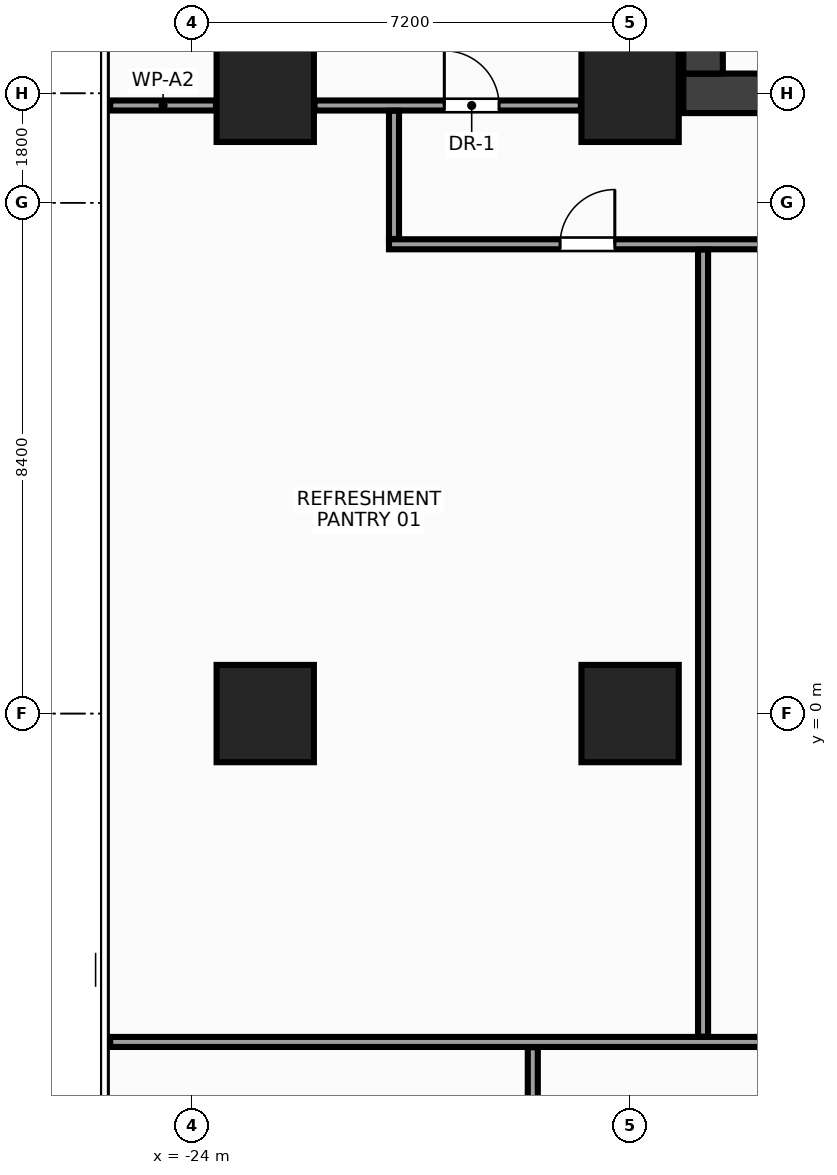
"""IFC4 building model, lengths in metres.
Left out: names, types, materials, properties, quantities, classifications, styles, units other than length and angle.
Written with IfcOpenShell. Run it as: python <this file> out.ifc"""

import sys

from ifc_helpers import new_model, si_unit, direction, frame, frame_2d, origin, origin_2d, place, context, subcontext, project, spatial, rectangle, extrude, source, transform, mapped, element, fill, save


model = new_model("IFC4")
c1 = context("Model", 3, precision=1e-05, world=origin(), true_north=direction((0.0, 1.0)))
c2 = subcontext(c1, "Body", "Model", "MODEL_VIEW")
j1 = project(units=[si_unit("LENGTHUNIT", "METRE"), si_unit("PLANEANGLEUNIT", "RADIAN")], contexts=[c1])
p1 = place(None, origin())
s1 = spatial("IfcSite", under=j1, at=p1, CompositionType="ELEMENT")
p2 = place(p1, origin())
s2 = spatial("IfcBuilding", under=s1, at=p2, CompositionType="ELEMENT")
p3 = place(p2, frame((0.0, 0.0, 106.4)))
s3 = spatial("IfcBuildingStorey", under=s2, at=p3, CompositionType="ELEMENT", Elevation=106.4)
m1 = source(origin(), c2, "Body", "SweptSolid", [
    extrude(rectangle(XDim=31.85, YDim=0.65, at=frame_2d((15.925, 0.0))), origin(), (0.0, 0.0, 1.0), 3.6),
])
p4 = place(p3, frame((-15.925, 10.2, 0.0), z_axis=(0.0, 0.0, 1.0), x_axis=(1.0, 0.0, 0.0)))
e1 = element("IfcWall", 1, at=p4, inside=s3, PredefinedType="SHEAR", context=c2, shape_type="MappedRepresentation", body=[
    mapped(m1, transform((0.0, 0.0, 0.0), x_axis=(1.0, 0.0, 0.0), y_axis=(0.0, 1.0, 0.0), z_axis=(0.0, 0.0, 1.0), scale=1.0)),
])
p5 = place(p4, frame((1.775, 0.0, 0.0)))
e2 = element("IfcOpeningElement", 2, at=p5, cuts=e1, PredefinedType="OPENING", context=c2, shape_type="SweptSolid", body=[
    extrude(rectangle(XDim=1.6, YDim=2.15, at=frame_2d((0.8, 1.075))), frame((0.0, 0.337, 0.0), z_axis=(0.0, -1.0, 0.0), x_axis=(1.0, 0.0, 0.0)), (0.0, 0.0, 1.0), 0.674),
])
p6 = place(p4, frame((28.475, 0.0, 0.0)))
e3 = element("IfcOpeningElement", 3, at=p6, cuts=e1, PredefinedType="OPENING", context=c2, shape_type="SweptSolid", body=[
    extrude(rectangle(XDim=1.6, YDim=2.15, at=frame_2d((0.8, 1.075))), frame((0.0, 0.337, 0.0), z_axis=(0.0, -1.0, 0.0), x_axis=(1.0, 0.0, 0.0)), (0.0, 0.0, 1.0), 0.674),
])
p7 = place(p4, frame((15.175, 0.0, 0.0)))
e4 = element("IfcOpeningElement", 4, at=p7, cuts=e1, PredefinedType="OPENING", context=c2, shape_type="SweptSolid", body=[
    extrude(rectangle(XDim=1.5, YDim=2.2, at=frame_2d((0.75, 1.1))), frame((0.0, 0.337, 0.0), z_axis=(0.0, -1.0, 0.0), x_axis=(1.0, 0.0, 0.0)), (0.0, 0.0, 1.0), 0.674),
])
m2 = source(origin(), c2, "Body", "SweptSolid", [
    extrude(rectangle(XDim=12.95, YDim=0.65, at=frame_2d((6.475, 0.0))), origin(), (0.0, 0.0, 1.0), 3.6),
])
p8 = place(p3, frame((-15.6, 10.525, 0.0), z_axis=(0.0, 0.0, 1.0), x_axis=(0.0, 1.0, 0.0)))
e5 = element("IfcWall", 5, at=p8, inside=s3, PredefinedType="SHEAR", context=c2, shape_type="MappedRepresentation", body=[
    mapped(m2, transform((0.0, 0.0, 0.0), x_axis=(1.0, 0.0, 0.0), y_axis=(0.0, 1.0, 0.0), z_axis=(0.0, 0.0, 1.0), scale=1.0)),
])
m3 = source(origin(), c2, "Body", "SweptSolid", [
    extrude(rectangle(XDim=1.6, YDim=1.6, at=origin_2d()), origin(), (0.0, 0.0, 1.0), 3.6),
])
for number, where, z_axis, x_axis in (
    (6, (-16.8, 0.0, 0.0), (0.0, 0.0, 1.0), (1.0, 0.0, 0.0)),
    (7, (-16.8, 10.2, 0.0), (0.0, 0.0, 1.0), (1.0, 0.0, 0.0)),
    (8, (-22.8, 0.0, 0.0), (0.0, 0.0, 1.0), (1.0, 0.0, 0.0)),
    (9, (-22.8, 10.2, 0.0), (0.0, 0.0, 1.0), (1.0, 0.0, 0.0)),
):
    element("IfcColumn", number, at=place(p3, frame(where, z_axis=z_axis, x_axis=x_axis)), inside=s3, PredefinedType="COLUMN", context=c2, shape_type="MappedRepresentation", body=[
        mapped(m3, transform((0.0, 0.0, 0.0), x_axis=(1.0, 0.0, 0.0), y_axis=(0.0, 1.0, 0.0), z_axis=(0.0, 0.0, 1.0), scale=1.0)),
    ])
m4 = source(origin(), c2, "Body", "SweptSolid", [
    extrude(rectangle(XDim=1.74, YDim=0.165, at=frame_2d((0.87, 0.0))), origin(), (0.0, 0.0, 1.0), 3.36),
])
p9 = place(p3, frame((-25.35, 10.0, 0.0), z_axis=(0.0, 0.0, 1.0), x_axis=(1.0, 0.0, 0.0)))
e10 = element("IfcWall", 10, at=p9, inside=s3, PredefinedType="PARTITIONING", context=c2, shape_type="MappedRepresentation", body=[
    mapped(m4, transform((0.0, 0.0, 0.0), x_axis=(1.0, 0.0, 0.0), y_axis=(0.0, 1.0, 0.0), z_axis=(0.0, 0.0, 1.0), scale=1.0)),
])
m5 = source(origin(), c2, "Body", "SweptSolid", [
    extrude(rectangle(XDim=4.38, YDim=0.165, at=frame_2d((2.19, 0.0))), origin(), (0.0, 0.0, 1.0), 2.745),
])
p10 = place(p3, frame((-21.99, 10.0, 0.0), z_axis=(0.0, 0.0, 1.0), x_axis=(1.0, 0.0, 0.0)))
e11 = element("IfcWall", 11, at=p10, inside=s3, PredefinedType="PARTITIONING", context=c2, shape_type="MappedRepresentation", body=[
    mapped(m5, transform((0.0, 0.0, 0.0), x_axis=(1.0, 0.0, 0.0), y_axis=(0.0, 1.0, 0.0), z_axis=(0.0, 0.0, 1.0), scale=1.0)),
])
p11 = place(p10, frame((2.135, 0.0, 0.0)))
e12 = element("IfcOpeningElement", 12, at=p11, cuts=e11, PredefinedType="OPENING", context=c2, shape_type="SweptSolid", body=[
    extrude(rectangle(XDim=0.9, YDim=2.15, at=frame_2d((0.45, 1.075))), frame((0.0, 0.094, 0.0), z_axis=(0.0, -1.0, 0.0), x_axis=(1.0, 0.0, 0.0)), (0.0, 0.0, 1.0), 0.189),
])
m6 = source(origin(), c2, "Body", "SweptSolid", [
    extrude(rectangle(XDim=16.8, YDim=0.165, at=frame_2d((8.4, 0.0))), origin(), (0.0, 0.0, 1.0), 2.745),
])
p12 = place(p3, frame((-20.765, 7.718, 0.0), z_axis=(0.0, 0.0, 1.0), x_axis=(1.0, 0.0, 0.0)))
e13 = element("IfcWall", 13, at=p12, inside=s3, PredefinedType="PARTITIONING", context=c2, shape_type="MappedRepresentation", body=[
    mapped(m6, transform((0.0, 0.0, 0.0), x_axis=(1.0, 0.0, 0.0), y_axis=(0.0, 1.0, 0.0), z_axis=(0.0, 0.0, 1.0), scale=1.0)),
])
p13 = place(p12, frame((2.814, 0.0, 0.0)))
e14 = element("IfcOpeningElement", 14, at=p13, cuts=e13, PredefinedType="OPENING", context=c2, shape_type="SweptSolid", body=[
    extrude(rectangle(XDim=0.9, YDim=2.15, at=frame_2d((0.45, 1.075))), frame((0.0, 0.094, 0.0), z_axis=(0.0, -1.0, 0.0), x_axis=(1.0, 0.0, 0.0)), (0.0, 0.0, 1.0), 0.189),
])
p14 = place(p12, frame((10.514, 0.0, 0.0)))
e15 = element("IfcOpeningElement", 15, at=p14, cuts=e13, PredefinedType="OPENING", context=c2, shape_type="SweptSolid", body=[
    extrude(rectangle(XDim=0.9, YDim=2.15, at=frame_2d((0.45, 1.075))), frame((0.0, 0.094, 0.0), z_axis=(0.0, -1.0, 0.0), x_axis=(1.0, 0.0, 0.0)), (0.0, 0.0, 1.0), 0.189),
])
m7 = source(origin(), c2, "Body", "SweptSolid", [
    extrude(rectangle(XDim=2.108, YDim=0.165, at=frame_2d((1.054, 0.0))), origin(), (0.0, 0.0, 1.0), 3.36),
])
p15 = place(p3, frame((-20.683, 7.805, 0.0), z_axis=(0.0, 0.0, 1.0), x_axis=(0.0, 1.0, 0.0)))
e16 = element("IfcWall", 16, at=p15, inside=s3, PredefinedType="PARTITIONING", context=c2, shape_type="MappedRepresentation", body=[
    mapped(m7, transform((0.0, 0.0, 0.0), x_axis=(1.0, 0.0, 0.0), y_axis=(0.0, 1.0, 0.0), z_axis=(0.0, 0.0, 1.0), scale=1.0)),
])
m8 = source(origin(), c2, "Body", "SweptSolid", [
    extrude(rectangle(XDim=21.38, YDim=0.165, at=frame_2d((10.69, 0.0))), origin(), (0.0, 0.0, 1.0), 2.745),
])
p16 = place(p3, frame((-25.35, -5.4, 0.0), z_axis=(0.0, 0.0, 1.0), x_axis=(1.0, 0.0, 0.0)))
e17 = element("IfcWall", 17, at=p16, inside=s3, PredefinedType="PARTITIONING", context=c2, shape_type="MappedRepresentation", body=[
    mapped(m8, transform((0.0, 0.0, 0.0), x_axis=(1.0, 0.0, 0.0), y_axis=(0.0, 1.0, 0.0), z_axis=(0.0, 0.0, 1.0), scale=1.0)),
])
m9 = source(origin(), c2, "Body", "SweptSolid", [
    extrude(rectangle(XDim=12.942, YDim=0.165, at=frame_2d((6.471, 0.0))), origin(), (0.0, 0.0, 1.0), 2.645),
])
p17 = place(p3, frame((-15.6, -5.312, 0.0), z_axis=(0.0, 0.0, 1.0), x_axis=(0.0, 1.0, 0.0)))
e18 = element("IfcWall", 18, at=p17, inside=s3, PredefinedType="PARTITIONING", context=c2, shape_type="MappedRepresentation", body=[
    mapped(m9, transform((0.0, 0.0, 0.0), x_axis=(1.0, 0.0, 0.0), y_axis=(0.0, 1.0, 0.0), z_axis=(0.0, 0.0, 1.0), scale=1.0)),
])
m10 = source(origin(), c2, "Body", "SweptSolid", [
    extrude(rectangle(XDim=3.142, YDim=0.165, at=frame_2d((1.571, 0.0))), origin(), (0.0, 0.0, 1.0), 3.36),
])
p18 = place(p3, frame((-18.4, -8.63, 0.0), z_axis=(0.0, 0.0, 1.0), x_axis=(0.0, 1.0, 0.0)))
e19 = element("IfcWall", 19, at=p18, inside=s3, PredefinedType="PARTITIONING", context=c2, shape_type="MappedRepresentation", body=[
    mapped(m10, transform((0.0, 0.0, 0.0), x_axis=(1.0, 0.0, 0.0), y_axis=(0.0, 1.0, 0.0), z_axis=(0.0, 0.0, 1.0), scale=1.0)),
])
m11 = source(origin(), c2, "Body", "SweptSolid", [
    extrude(rectangle(XDim=0.9, YDim=2.15, at=frame_2d((0.45, 1.075))), frame((0.0, 0.025, 0.0), z_axis=(0.0, -1.0, 0.0), x_axis=(1.0, 0.0, 0.0)), (0.0, 0.0, 1.0), 0.05),
])
p19 = place(p11, origin())
e20 = element("IfcDoor", 20, at=p19, inside=s3, OperationType="SINGLE_SWING_LEFT", PredefinedType="DOOR", context=c2, shape_type="MappedRepresentation", body=[
    mapped(m11, transform((0.0, 0.0, 0.0), x_axis=(1.0, 0.0, 0.0), y_axis=(0.0, 1.0, 0.0), z_axis=(0.0, 0.0, 1.0), scale=1.0)),
])
fill(e12, e20)
p20 = place(p13, origin())
e21 = element("IfcDoor", 21, at=p20, inside=s3, OperationType="SINGLE_SWING_RIGHT", PredefinedType="DOOR", context=c2, shape_type="MappedRepresentation", body=[
    mapped(m11, transform((0.0, 0.0, 0.0), x_axis=(1.0, 0.0, 0.0), y_axis=(0.0, 1.0, 0.0), z_axis=(0.0, 0.0, 1.0), scale=1.0)),
])
fill(e14, e21)
save(model, sys.argv[1])
